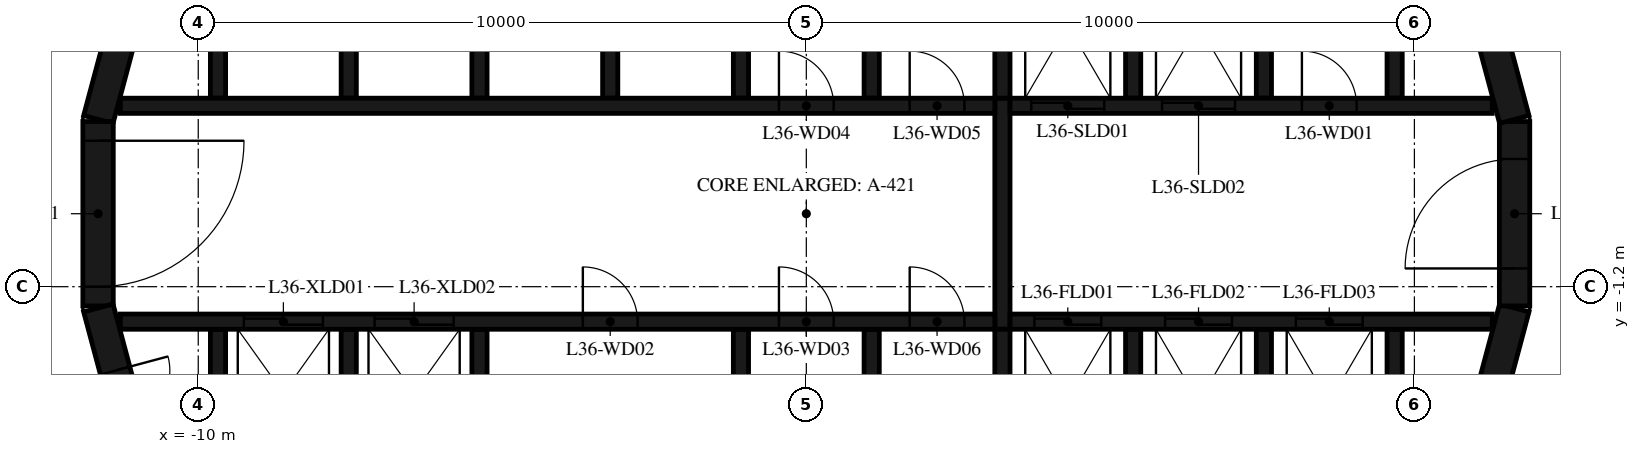
"""IFC4 building model, lengths in metres.
Left out: names, types, materials, properties, quantities, classifications, styles, units other than length and angle.
Written with IfcOpenShell. Run it as: python <this file> out.ifc"""

import sys

from ifc_helpers import new_model, si_unit, direction, frame, frame_2d, origin, place, context, subcontext, project, spatial, polyline, rectangle, outline, extrude, element, fill, save


model = new_model("IFC4")
c1 = context("Model", 3, precision=1e-05, world=origin(), true_north=direction((0.0, 1.0)))
c2 = subcontext(c1, "Body", "Model", "MODEL_VIEW")
j1 = project(units=[si_unit("LENGTHUNIT", "METRE"), si_unit("PLANEANGLEUNIT", "RADIAN")], contexts=[c1])
p1 = place(None, origin())
s1 = spatial("IfcSite", under=j1, at=p1, CompositionType="ELEMENT")
p2 = place(p1, origin())
s2 = spatial("IfcBuilding", under=s1, at=p2, CompositionType="ELEMENT")
p3 = place(p2, frame((0.0, 0.0, 144.9)))
s3 = spatial("IfcBuildingStorey", under=s2, at=p3, CompositionType="ELEMENT", Elevation=144.9)
p4 = place(p3, frame((10.858, -4.479, 0.0), z_axis=(0.0, 0.0, 1.0), x_axis=(0.258734743916, 0.965948410781, 0.0)))
e1 = element("IfcWall", 1, at=p4, inside=s3, PredefinedType="SHEAR", context=c2, shape_type="SweptSolid", body=[
    extrude(rectangle(XDim=3.033, YDim=0.5, at=frame_2d((1.516, 0.0))), origin(), (0.0, 0.0, 1.0), 6.35),
])
p5 = place(p3, frame((11.647, -1.516, 0.0), z_axis=(0.0, 0.0, 1.0), x_axis=(0.0, 1.0, 0.0)))
e2 = element("IfcWall", 2, at=p5, inside=s3, PredefinedType="SHEAR", context=c2, shape_type="SweptSolid", body=[
    extrude(rectangle(XDim=3.033, YDim=0.5, at=frame_2d((1.516, 0.0))), origin(), (0.0, 0.0, 1.0), 6.35),
])
p6 = place(p5, frame((0.616, 0.0, 0.0)))
e3 = element("IfcOpeningElement", 3, at=p6, cuts=e2, PredefinedType="OPENING", context=c2, shape_type="SweptSolid", body=[
    extrude(rectangle(XDim=1.8, YDim=2.1, at=frame_2d((0.9, 1.05))), frame((0.0, 0.26, 0.0), z_axis=(0.0, -1.0, 0.0), x_axis=(1.0, 0.0, 0.0)), (0.0, 0.0, 1.0), 0.52),
])
for number, where, z_axis, x_axis in (
    (4, (11.643, 1.55, 0.0), (0.0, 0.0, 1.0), (-0.259, 0.966, 0.0)),
    (5, (-10.858, 4.479, 0.0), (0.0, 0.0, 1.0), (-0.259, -0.966, 0.0)),
):
    element("IfcWall", number, at=place(p3, frame(where, z_axis=z_axis, x_axis=x_axis)), inside=s3, PredefinedType="SHEAR", context=c2, shape_type="SweptSolid", body=[
        extrude(rectangle(XDim=3.033, YDim=0.5, at=frame_2d((1.516, 0.0))), origin(), (0.0, 0.0, 1.0), 6.35),
    ])
p7 = place(p3, frame((-11.647, 1.516, 0.0), z_axis=(0.0, 0.0, 1.0), x_axis=(0.0, -1.0, 0.0)))
e6 = element("IfcWall", 6, at=p7, inside=s3, PredefinedType="SHEAR", context=c2, shape_type="SweptSolid", body=[
    extrude(rectangle(XDim=3.033, YDim=0.5, at=frame_2d((1.516, 0.0))), origin(), (0.0, 0.0, 1.0), 6.35),
])
p8 = place(p7, frame((0.316, 0.0, 0.0)))
e7 = element("IfcOpeningElement", 7, at=p8, cuts=e6, PredefinedType="OPENING", context=c2, shape_type="SweptSolid", body=[
    extrude(rectangle(XDim=2.4, YDim=2.1, at=frame_2d((1.2, 1.05))), frame((0.0, 0.26, 0.0), z_axis=(0.0, -1.0, 0.0), x_axis=(1.0, 0.0, 0.0)), (0.0, 0.0, 1.0), 0.52),
])
p9 = place(p3, frame((-11.643, -1.55, 0.0), z_axis=(0.0, 0.0, 1.0), x_axis=(0.258734743916, -0.965948410781, 0.0)))
e8 = element("IfcWall", 8, at=p9, inside=s3, PredefinedType="SHEAR", context=c2, shape_type="SweptSolid", body=[
    extrude(rectangle(XDim=3.033, YDim=0.5, at=frame_2d((1.516, 0.0))), origin(), (0.0, 0.0, 1.0), 6.35),
])
p10 = place(p9, frame((1.066, 0.0, 0.0)))
e9 = element("IfcOpeningElement", 9, at=p10, cuts=e8, PredefinedType="OPENING", context=c2, shape_type="SweptSolid", body=[
    extrude(rectangle(XDim=0.9, YDim=2.1, at=frame_2d((0.45, 1.05))), frame((0.0, 0.26, 0.0), z_axis=(0.0, -1.0, 0.0), x_axis=(1.0, 0.0, 0.0)), (0.0, 0.0, 1.0), 0.52),
])
p11 = place(p3, origin())
e10 = element("IfcWall", 10, at=p11, inside=s3, PredefinedType="SHEAR", context=c2, shape_type="SweptSolid", body=[
    extrude(outline(polyline([(-9.55, 4.8), (-7.65, 4.8), (-7.65, 1.9), (-7.4, 1.9), (-7.4, 4.8), (-5.5, 4.8), (-5.5, 1.9), (-5.25, 1.9), (-5.25, 4.8), (-3.35, 4.8), (-3.35, 1.9), (-3.1, 1.9), (-3.1, 4.8), (-1.2, 4.8), (-1.2, 1.9), (-0.95, 1.9), (-0.95, 4.8), (0.95, 4.8), (0.95, 1.9), (1.2, 1.9), (1.2, 4.8), (3.1, 4.8), (3.1, 1.9), (3.35, 1.9), (3.35, 4.8), (5.25, 4.8), (5.25, 1.9), (5.5, 1.9), (5.5, 4.8), (7.4, 4.8), (7.4, 1.9), (7.65, 1.9), (7.65, 4.8), (9.55, 4.8), (9.55, 1.9), (9.8, 1.9), (9.8, 4.8), (9.8, 5.05), (-9.8, 5.05), (-9.8, 4.8), (-9.8, 1.9), (-9.55, 1.9), (-9.55, 4.8)])), origin(), (0.0, 0.0, 1.0), 6.35),
])
p12 = place(p3, origin())
e11 = element("IfcWall", 11, at=p12, inside=s3, PredefinedType="SHEAR", context=c2, shape_type="SweptSolid", body=[
    extrude(outline(polyline([(9.8, -5.05), (9.8, -4.8), (9.8, -1.9), (9.55, -1.9), (9.55, -4.8), (7.65, -4.8), (7.65, -1.9), (7.4, -1.9), (7.4, -4.8), (5.5, -4.8), (5.5, -1.9), (5.25, -1.9), (5.25, -4.8), (3.35, -4.8), (3.35, -1.9), (3.1, -1.9), (3.1, -4.8), (1.2, -4.8), (1.2, -1.9), (0.95, -1.9), (0.95, -4.8), (-0.95, -4.8), (-0.95, -1.9), (-1.2, -1.9), (-1.2, -4.8), (-5.25, -4.8), (-5.25, -1.9), (-5.5, -1.9), (-5.5, -4.8), (-7.4, -4.8), (-7.4, -1.9), (-7.65, -1.9), (-7.65, -4.8), (-9.55, -4.8), (-9.55, -1.9), (-9.8, -1.9), (-9.8, -4.8), (-9.8, -5.05), (9.8, -5.05)])), origin(), (0.0, 0.0, 1.0), 6.35),
])
p13 = place(p3, frame((-11.28, 1.775, 0.0), z_axis=(0.0, 0.0, 1.0), x_axis=(1.0, 0.0, 0.0)))
e12 = element("IfcWall", 12, at=p13, inside=s3, PredefinedType="SHEAR", context=c2, shape_type="SweptSolid", body=[
    extrude(rectangle(XDim=14.38, YDim=0.25, at=frame_2d((7.19, 0.0))), origin(), (0.0, 0.0, 1.0), 6.35),
])
p14 = place(p13, frame((10.83, 0.0, 0.0)))
e13 = element("IfcOpeningElement", 13, at=p14, cuts=e12, PredefinedType="OPENING", context=c2, shape_type="SweptSolid", body=[
    extrude(rectangle(XDim=0.9, YDim=2.1, at=frame_2d((0.45, 1.05))), frame((0.0, 0.135, 0.0), z_axis=(0.0, -1.0, 0.0), x_axis=(1.0, 0.0, 0.0)), (0.0, 0.0, 1.0), 0.27),
])
p15 = place(p13, frame((12.98, 0.0, 0.0)))
e14 = element("IfcOpeningElement", 14, at=p15, cuts=e12, PredefinedType="OPENING", context=c2, shape_type="SweptSolid", body=[
    extrude(rectangle(XDim=0.9, YDim=2.1, at=frame_2d((0.45, 1.05))), frame((0.0, 0.135, 0.0), z_axis=(0.0, -1.0, 0.0), x_axis=(1.0, 0.0, 0.0)), (0.0, 0.0, 1.0), 0.27),
])
p16 = place(p3, frame((3.35, 1.775, 0.0), z_axis=(0.0, 0.0, 1.0), x_axis=(1.0, 0.0, 0.0)))
e15 = element("IfcWall", 15, at=p16, inside=s3, PredefinedType="SHEAR", context=c2, shape_type="SweptSolid", body=[
    extrude(rectangle(XDim=7.93, YDim=0.25, at=frame_2d((3.965, 0.0))), origin(), (0.0, 0.0, 1.0), 6.35),
])
p17 = place(p16, frame((0.35, 0.0, 0.0)))
e16 = element("IfcOpeningElement", 16, at=p17, cuts=e15, PredefinedType="OPENING", context=c2, shape_type="SweptSolid", body=[
    extrude(rectangle(XDim=1.2, YDim=2.4, at=frame_2d((0.6, 1.2))), frame((0.0, 0.135, 0.0), z_axis=(0.0, -1.0, 0.0), x_axis=(1.0, 0.0, 0.0)), (0.0, 0.0, 1.0), 0.27),
])
p18 = place(p16, frame((2.5, 0.0, 0.0)))
e17 = element("IfcOpeningElement", 17, at=p18, cuts=e15, PredefinedType="OPENING", context=c2, shape_type="SweptSolid", body=[
    extrude(rectangle(XDim=1.2, YDim=2.4, at=frame_2d((0.6, 1.2))), frame((0.0, 0.135, 0.0), z_axis=(0.0, -1.0, 0.0), x_axis=(1.0, 0.0, 0.0)), (0.0, 0.0, 1.0), 0.27),
])
p19 = place(p16, frame((4.8, 0.0, 0.0)))
e18 = element("IfcOpeningElement", 18, at=p19, cuts=e15, PredefinedType="OPENING", context=c2, shape_type="SweptSolid", body=[
    extrude(rectangle(XDim=0.9, YDim=2.1, at=frame_2d((0.45, 1.05))), frame((0.0, 0.135, 0.0), z_axis=(0.0, -1.0, 0.0), x_axis=(1.0, 0.0, 0.0)), (0.0, 0.0, 1.0), 0.27),
])
p20 = place(p3, frame((-11.28, -1.775, 0.0), z_axis=(0.0, 0.0, 1.0), x_axis=(1.0, 0.0, 0.0)))
e19 = element("IfcWall", 19, at=p20, inside=s3, PredefinedType="SHEAR", context=c2, shape_type="SweptSolid", body=[
    extrude(rectangle(XDim=14.38, YDim=0.25, at=frame_2d((7.19, 0.0))), origin(), (0.0, 0.0, 1.0), 6.35),
])
p21 = place(p20, frame((2.03, 0.0, 0.0)))
e20 = element("IfcOpeningElement", 20, at=p21, cuts=e19, PredefinedType="OPENING", context=c2, shape_type="SweptSolid", body=[
    extrude(rectangle(XDim=1.3, YDim=2.1, at=frame_2d((0.65, 1.05))), frame((0.0, 0.135, 0.0), z_axis=(0.0, -1.0, 0.0), x_axis=(1.0, 0.0, 0.0)), (0.0, 0.0, 1.0), 0.27),
])
p22 = place(p20, frame((4.18, 0.0, 0.0)))
e21 = element("IfcOpeningElement", 21, at=p22, cuts=e19, PredefinedType="OPENING", context=c2, shape_type="SweptSolid", body=[
    extrude(rectangle(XDim=1.3, YDim=2.1, at=frame_2d((0.65, 1.05))), frame((0.0, 0.135, 0.0), z_axis=(0.0, -1.0, 0.0), x_axis=(1.0, 0.0, 0.0)), (0.0, 0.0, 1.0), 0.27),
])
p23 = place(p20, frame((7.605, 0.0, 0.0)))
e22 = element("IfcOpeningElement", 22, at=p23, cuts=e19, PredefinedType="OPENING", context=c2, shape_type="SweptSolid", body=[
    extrude(rectangle(XDim=0.9, YDim=2.1, at=frame_2d((0.45, 1.05))), frame((0.0, 0.135, 0.0), z_axis=(0.0, -1.0, 0.0), x_axis=(1.0, 0.0, 0.0)), (0.0, 0.0, 1.0), 0.27),
])
p24 = place(p20, frame((10.83, 0.0, 0.0)))
e23 = element("IfcOpeningElement", 23, at=p24, cuts=e19, PredefinedType="OPENING", context=c2, shape_type="SweptSolid", body=[
    extrude(rectangle(XDim=0.9, YDim=2.1, at=frame_2d((0.45, 1.05))), frame((0.0, 0.135, 0.0), z_axis=(0.0, -1.0, 0.0), x_axis=(1.0, 0.0, 0.0)), (0.0, 0.0, 1.0), 0.27),
])
p25 = place(p20, frame((12.98, 0.0, 0.0)))
e24 = element("IfcOpeningElement", 24, at=p25, cuts=e19, PredefinedType="OPENING", context=c2, shape_type="SweptSolid", body=[
    extrude(rectangle(XDim=0.9, YDim=2.1, at=frame_2d((0.45, 1.05))), frame((0.0, 0.135, 0.0), z_axis=(0.0, -1.0, 0.0), x_axis=(1.0, 0.0, 0.0)), (0.0, 0.0, 1.0), 0.27),
])
p26 = place(p3, frame((3.35, -1.775, 0.0), z_axis=(0.0, 0.0, 1.0), x_axis=(1.0, 0.0, 0.0)))
e25 = element("IfcWall", 25, at=p26, inside=s3, PredefinedType="SHEAR", context=c2, shape_type="SweptSolid", body=[
    extrude(rectangle(XDim=7.93, YDim=0.25, at=frame_2d((3.965, 0.0))), origin(), (0.0, 0.0, 1.0), 6.35),
])
p27 = place(p26, frame((0.4, 0.0, 0.0)))
e26 = element("IfcOpeningElement", 26, at=p27, cuts=e25, PredefinedType="OPENING", context=c2, shape_type="SweptSolid", body=[
    extrude(rectangle(XDim=1.1, YDim=2.4, at=frame_2d((0.55, 1.2))), frame((0.0, 0.135, 0.0), z_axis=(0.0, -1.0, 0.0), x_axis=(1.0, 0.0, 0.0)), (0.0, 0.0, 1.0), 0.27),
])
p28 = place(p26, frame((2.55, 0.0, 0.0)))
e27 = element("IfcOpeningElement", 27, at=p28, cuts=e25, PredefinedType="OPENING", context=c2, shape_type="SweptSolid", body=[
    extrude(rectangle(XDim=1.1, YDim=2.4, at=frame_2d((0.55, 1.2))), frame((0.0, 0.135, 0.0), z_axis=(0.0, -1.0, 0.0), x_axis=(1.0, 0.0, 0.0)), (0.0, 0.0, 1.0), 0.27),
])
p29 = place(p26, frame((4.7, 0.0, 0.0)))
e28 = element("IfcOpeningElement", 28, at=p29, cuts=e25, PredefinedType="OPENING", context=c2, shape_type="SweptSolid", body=[
    extrude(rectangle(XDim=1.1, YDim=2.4, at=frame_2d((0.55, 1.2))), frame((0.0, 0.135, 0.0), z_axis=(0.0, -1.0, 0.0), x_axis=(1.0, 0.0, 0.0)), (0.0, 0.0, 1.0), 0.27),
])
p30 = place(p3, frame((3.225, -1.9, 0.0), z_axis=(0.0, 0.0, 1.0), x_axis=(0.0, 1.0, 0.0)))
e29 = element("IfcWall", 29, at=p30, inside=s3, PredefinedType="SHEAR", context=c2, shape_type="SweptSolid", body=[
    extrude(rectangle(XDim=3.8, YDim=0.25, at=frame_2d((1.9, 0.0))), origin(), (0.0, 0.0, 1.0), 6.35),
])
p31 = place(p8, origin())
e30 = element("IfcDoor", 30, at=p31, inside=s3, OperationType="DOUBLE_DOOR_SINGLE_SWING", PredefinedType="DOOR", context=c2, shape_type="SweptSolid", body=[
    extrude(rectangle(XDim=2.4, YDim=2.1, at=frame_2d((1.2, 1.05))), frame((0.0, 0.025, 0.0), z_axis=(0.0, -1.0, 0.0), x_axis=(1.0, 0.0, 0.0)), (0.0, 0.0, 1.0), 0.05),
])
fill(e7, e30)
p32 = place(p6, origin())
e31 = element("IfcDoor", 31, at=p32, inside=s3, OperationType="DOUBLE_DOOR_SINGLE_SWING", PredefinedType="DOOR", context=c2, shape_type="SweptSolid", body=[
    extrude(rectangle(XDim=1.8, YDim=2.1, at=frame_2d((0.9, 1.05))), frame((0.0, 0.025, 0.0), z_axis=(0.0, -1.0, 0.0), x_axis=(1.0, 0.0, 0.0)), (0.0, 0.0, 1.0), 0.05),
])
fill(e3, e31)
p33 = place(p17, origin())
e32 = element("IfcDoor", 32, at=p33, inside=s3, OperationType="DOUBLE_DOOR_SLIDING", PredefinedType="DOOR", context=c2, shape_type="SweptSolid", body=[
    extrude(rectangle(XDim=1.2, YDim=2.4, at=frame_2d((0.6, 1.2))), frame((0.0, 0.025, 0.0), z_axis=(0.0, -1.0, 0.0), x_axis=(1.0, 0.0, 0.0)), (0.0, 0.0, 1.0), 0.05),
])
fill(e16, e32)
p34 = place(p18, origin())
e33 = element("IfcDoor", 33, at=p34, inside=s3, OperationType="DOUBLE_DOOR_SLIDING", PredefinedType="DOOR", context=c2, shape_type="SweptSolid", body=[
    extrude(rectangle(XDim=1.2, YDim=2.4, at=frame_2d((0.6, 1.2))), frame((0.0, 0.025, 0.0), z_axis=(0.0, -1.0, 0.0), x_axis=(1.0, 0.0, 0.0)), (0.0, 0.0, 1.0), 0.05),
])
fill(e17, e33)
p35 = place(p21, origin())
e34 = element("IfcDoor", 34, at=p35, inside=s3, OperationType="DOUBLE_DOOR_SLIDING", PredefinedType="DOOR", context=c2, shape_type="SweptSolid", body=[
    extrude(rectangle(XDim=1.3, YDim=2.1, at=frame_2d((0.65, 1.05))), frame((0.0, 0.025, 0.0), z_axis=(0.0, -1.0, 0.0), x_axis=(1.0, 0.0, 0.0)), (0.0, 0.0, 1.0), 0.05),
])
fill(e20, e34)
p36 = place(p22, origin())
e35 = element("IfcDoor", 35, at=p36, inside=s3, OperationType="DOUBLE_DOOR_SLIDING", PredefinedType="DOOR", context=c2, shape_type="SweptSolid", body=[
    extrude(rectangle(XDim=1.3, YDim=2.1, at=frame_2d((0.65, 1.05))), frame((0.0, 0.025, 0.0), z_axis=(0.0, -1.0, 0.0), x_axis=(1.0, 0.0, 0.0)), (0.0, 0.0, 1.0), 0.05),
])
fill(e21, e35)
p37 = place(p27, origin())
e36 = element("IfcDoor", 36, at=p37, inside=s3, OperationType="DOUBLE_DOOR_SLIDING", PredefinedType="DOOR", context=c2, shape_type="SweptSolid", body=[
    extrude(rectangle(XDim=1.1, YDim=2.4, at=frame_2d((0.55, 1.2))), frame((0.0, 0.025, 0.0), z_axis=(0.0, -1.0, 0.0), x_axis=(1.0, 0.0, 0.0)), (0.0, 0.0, 1.0), 0.05),
])
fill(e26, e36)
p38 = place(p28, origin())
e37 = element("IfcDoor", 37, at=p38, inside=s3, OperationType="DOUBLE_DOOR_SLIDING", PredefinedType="DOOR", context=c2, shape_type="SweptSolid", body=[
    extrude(rectangle(XDim=1.1, YDim=2.4, at=frame_2d((0.55, 1.2))), frame((0.0, 0.025, 0.0), z_axis=(0.0, -1.0, 0.0), x_axis=(1.0, 0.0, 0.0)), (0.0, 0.0, 1.0), 0.05),
])
fill(e27, e37)
p39 = place(p29, origin())
e38 = element("IfcDoor", 38, at=p39, inside=s3, OperationType="DOUBLE_DOOR_SLIDING", PredefinedType="DOOR", context=c2, shape_type="SweptSolid", body=[
    extrude(rectangle(XDim=1.1, YDim=2.4, at=frame_2d((0.55, 1.2))), frame((0.0, 0.025, 0.0), z_axis=(0.0, -1.0, 0.0), x_axis=(1.0, 0.0, 0.0)), (0.0, 0.0, 1.0), 0.05),
])
fill(e28, e38)
p40 = place(p19, origin())
e39 = element("IfcDoor", 39, at=p40, inside=s3, OperationType="SINGLE_SWING_RIGHT", PredefinedType="DOOR", context=c2, shape_type="SweptSolid", body=[
    extrude(rectangle(XDim=0.9, YDim=2.1, at=frame_2d((0.45, 1.05))), frame((0.0, 0.025, 0.0), z_axis=(0.0, -1.0, 0.0), x_axis=(1.0, 0.0, 0.0)), (0.0, 0.0, 1.0), 0.05),
])
fill(e18, e39)
p41 = place(p23, origin())
e40 = element("IfcDoor", 40, at=p41, inside=s3, OperationType="SINGLE_SWING_LEFT", PredefinedType="DOOR", context=c2, shape_type="SweptSolid", body=[
    extrude(rectangle(XDim=0.9, YDim=2.1, at=frame_2d((0.45, 1.05))), frame((0.0, 0.025, 0.0), z_axis=(0.0, -1.0, 0.0), x_axis=(1.0, 0.0, 0.0)), (0.0, 0.0, 1.0), 0.05),
])
fill(e22, e40)
p42 = place(p24, origin())
e41 = element("IfcDoor", 41, at=p42, inside=s3, OperationType="SINGLE_SWING_RIGHT", PredefinedType="DOOR", context=c2, shape_type="SweptSolid", body=[
    extrude(rectangle(XDim=0.9, YDim=2.1, at=frame_2d((0.45, 1.05))), frame((0.0, 0.025, 0.0), z_axis=(0.0, -1.0, 0.0), x_axis=(1.0, 0.0, 0.0)), (0.0, 0.0, 1.0), 0.05),
])
fill(e23, e41)
p43 = place(p14, origin())
e42 = element("IfcDoor", 42, at=p43, inside=s3, OperationType="SINGLE_SWING_LEFT", PredefinedType="DOOR", context=c2, shape_type="SweptSolid", body=[
    extrude(rectangle(XDim=0.9, YDim=2.1, at=frame_2d((0.45, 1.05))), frame((0.0, 0.025, 0.0), z_axis=(0.0, -1.0, 0.0), x_axis=(1.0, 0.0, 0.0)), (0.0, 0.0, 1.0), 0.05),
])
fill(e13, e42)
p44 = place(p15, origin())
e43 = element("IfcDoor", 43, at=p44, inside=s3, OperationType="SINGLE_SWING_RIGHT", PredefinedType="DOOR", context=c2, shape_type="SweptSolid", body=[
    extrude(rectangle(XDim=0.9, YDim=2.1, at=frame_2d((0.45, 1.05))), frame((0.0, 0.025, 0.0), z_axis=(0.0, -1.0, 0.0), x_axis=(1.0, 0.0, 0.0)), (0.0, 0.0, 1.0), 0.05),
])
fill(e14, e43)
p45 = place(p25, origin())
e44 = element("IfcDoor", 44, at=p45, inside=s3, OperationType="SINGLE_SWING_LEFT", PredefinedType="DOOR", context=c2, shape_type="SweptSolid", body=[
    extrude(rectangle(XDim=0.9, YDim=2.1, at=frame_2d((0.45, 1.05))), frame((0.0, 0.025, 0.0), z_axis=(0.0, -1.0, 0.0), x_axis=(1.0, 0.0, 0.0)), (0.0, 0.0, 1.0), 0.05),
])
fill(e24, e44)
p46 = place(p10, origin())
e45 = element("IfcDoor", 45, at=p46, inside=s3, OperationType="SINGLE_SWING_RIGHT", PredefinedType="DOOR", context=c2, shape_type="SweptSolid", body=[
    extrude(rectangle(XDim=0.9, YDim=2.1, at=frame_2d((0.45, 1.05))), frame((0.0, 0.025, 0.0), z_axis=(0.0, -1.0, 0.0), x_axis=(1.0, 0.0, 0.0)), (0.0, 0.0, 1.0), 0.05),
])
fill(e9, e45)
save(model, sys.argv[1])
